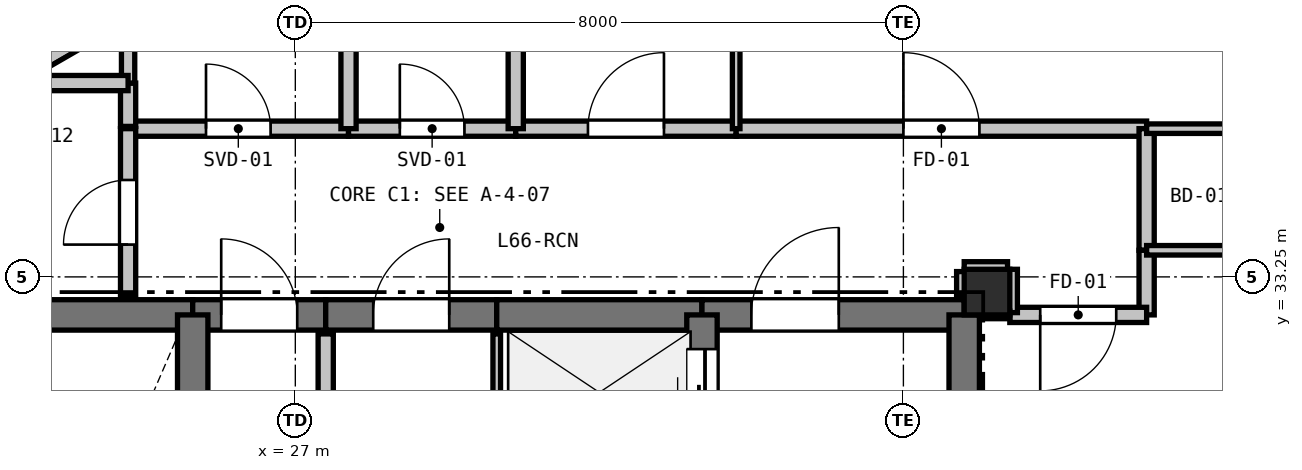
"""IFC4 building model, lengths in metres.
Left out: names, types, materials, properties, quantities, classifications, styles, units other than length and angle.
Written with IfcOpenShell. Run it as: python <this file> out.ifc"""

import sys

from ifc_helpers import new_model, si_unit, direction, frame, frame_2d, origin, origin_2d, place, context, subcontext, project, spatial, rectangle, extrude, element, fill, save


model = new_model("IFC4")
c1 = context("Model", 3, precision=1e-05, world=origin(), true_north=direction((0.0, 1.0)))
c2 = subcontext(c1, "Body", "Model", "MODEL_VIEW")
j1 = project(units=[si_unit("LENGTHUNIT", "METRE"), si_unit("PLANEANGLEUNIT", "RADIAN")], contexts=[c1])
p1 = place(None, origin())
s1 = spatial("IfcSite", under=j1, at=p1, CompositionType="ELEMENT")
p2 = place(p1, origin())
s2 = spatial("IfcBuilding", under=s1, at=p2, CompositionType="ELEMENT")
p3 = place(p2, frame((0.0, 0.0, 236.4)))
s3 = spatial("IfcBuildingStorey", under=s2, at=p3, CompositionType="ELEMENT", Elevation=236.4)
p4 = place(p3, frame((36.1, 33.05, 0.0), z_axis=(0.0, 0.0, 1.0), x_axis=(1.0, 0.0, 0.0)))
e1 = element("IfcColumn", 1, at=p4, inside=s3, PredefinedType="COLUMN", context=c2, shape_type="SweptSolid", body=[
    extrude(rectangle(XDim=0.6, YDim=0.6, at=origin_2d()), origin(), (0.0, 0.0, 1.0), 3.3),
])
p5 = place(p3, frame((20.066, 33.997, 0.0), z_axis=(0.0, 0.0, 1.0), x_axis=(0.866019557082, 0.500010126649, 0.0)))
e2 = element("IfcWall", 2, at=p5, inside=s3, PredefinedType="PARAPET", context=c2, shape_type="SweptSolid", body=[
    extrude(rectangle(XDim=8.228, YDim=0.2, at=frame_2d((4.114, 0.0))), origin(), (0.0, 0.0, 1.0), 0.2),
])
p6 = place(p3, frame((22.2, 32.75, 0.0), z_axis=(0.0, 0.0, 1.0), x_axis=(1.0, 0.0, 0.0)))
e3 = element("IfcWall", 3, at=p6, inside=s3, PredefinedType="SHEAR", context=c2, shape_type="SweptSolid", body=[
    extrude(rectangle(XDim=3.45, YDim=0.4, at=frame_2d((1.725, 0.0))), origin(), (0.0, 0.0, 1.0), 3.08),
])
p7 = place(p3, frame((25.65, 32.75, 0.0), z_axis=(0.0, 0.0, 1.0), x_axis=(1.0, 0.0, 0.0)))
e4 = element("IfcWall", 4, at=p7, inside=s3, PredefinedType="SHEAR", context=c2, shape_type="SweptSolid", body=[
    extrude(rectangle(XDim=1.75, YDim=0.4, at=frame_2d((0.875, 0.0))), origin(), (0.0, 0.0, 1.0), 3.08),
])
p8 = place(p7, frame((0.375, 0.0, 0.0)))
e5 = element("IfcOpeningElement", 5, at=p8, cuts=e4, PredefinedType="OPENING", context=c2, shape_type="SweptSolid", body=[
    extrude(rectangle(XDim=1.0, YDim=2.15, at=frame_2d((0.5, 1.075))), frame((0.0, 0.21, 0.0), z_axis=(0.0, -1.0, 0.0), x_axis=(1.0, 0.0, 0.0)), (0.0, 0.0, 1.0), 0.42),
])
p9 = place(p3, frame((27.4, 32.75, 0.0), z_axis=(0.0, 0.0, 1.0), x_axis=(1.0, 0.0, 0.0)))
e6 = element("IfcWall", 6, at=p9, inside=s3, PredefinedType="SHEAR", context=c2, shape_type="SweptSolid", body=[
    extrude(rectangle(XDim=2.25, YDim=0.4, at=frame_2d((1.125, 0.0))), origin(), (0.0, 0.0, 1.0), 3.08),
])
p10 = place(p9, frame((0.625, 0.0, 0.0)))
e7 = element("IfcOpeningElement", 7, at=p10, cuts=e6, PredefinedType="OPENING", context=c2, shape_type="SweptSolid", body=[
    extrude(rectangle(XDim=1.0, YDim=2.15, at=frame_2d((0.5, 1.075))), frame((0.0, 0.21, 0.0), z_axis=(0.0, -1.0, 0.0), x_axis=(1.0, 0.0, 0.0)), (0.0, 0.0, 1.0), 0.42),
])
p11 = place(p3, frame((29.65, 32.75, 0.0), z_axis=(0.0, 0.0, 1.0), x_axis=(1.0, 0.0, 0.0)))
e8 = element("IfcWall", 8, at=p11, inside=s3, PredefinedType="SHEAR", context=c2, shape_type="SweptSolid", body=[
    extrude(rectangle(XDim=2.7, YDim=0.4, at=frame_2d((1.35, 0.0))), origin(), (0.0, 0.0, 1.0), 3.08),
])
p12 = place(p3, frame((32.35, 32.75, 0.0), z_axis=(0.0, 0.0, 1.0), x_axis=(1.0, 0.0, 0.0)))
e9 = element("IfcWall", 9, at=p12, inside=s3, PredefinedType="SHEAR", context=c2, shape_type="SweptSolid", body=[
    extrude(rectangle(XDim=3.45, YDim=0.4, at=frame_2d((1.725, 0.0))), origin(), (0.0, 0.0, 1.0), 3.08),
])
p13 = place(p12, frame((0.65, 0.0, 0.0)))
e10 = element("IfcOpeningElement", 10, at=p13, cuts=e9, PredefinedType="OPENING", context=c2, shape_type="SweptSolid", body=[
    extrude(rectangle(XDim=1.15, YDim=2.15, at=frame_2d((0.575, 1.075))), frame((0.0, 0.21, 0.0), z_axis=(0.0, -1.0, 0.0), x_axis=(1.0, 0.0, 0.0)), (0.0, 0.0, 1.0), 0.42),
])
p14 = place(p3, frame((35.8, 32.75, 0.0), z_axis=(0.0, 0.0, 1.0), x_axis=(0.0, -1.0, 0.0)))
e11 = element("IfcWall", 11, at=p14, inside=s3, PredefinedType="SHEAR", context=c2, shape_type="SweptSolid", body=[
    extrude(rectangle(XDim=4.65, YDim=0.4, at=frame_2d((2.325, 0.0))), origin(), (0.0, 0.0, 1.0), 3.08),
])
p15 = place(p3, frame((25.65, 27.95, 0.0), z_axis=(0.0, 0.0, 1.0), x_axis=(0.0, 1.0, 0.0)))
e12 = element("IfcWall", 12, at=p15, inside=s3, PredefinedType="SHEAR", context=c2, shape_type="SweptSolid", body=[
    extrude(rectangle(XDim=4.8, YDim=0.4, at=frame_2d((2.4, 0.0))), origin(), (0.0, 0.0, 1.0), 3.08),
])
p16 = place(p3, frame((32.35, 30.75, 0.0), z_axis=(0.0, 0.0, 1.0), x_axis=(0.0, 1.0, 0.0)))
e13 = element("IfcWall", 13, at=p16, inside=s3, PredefinedType="SHEAR", context=c2, shape_type="SweptSolid", body=[
    extrude(rectangle(XDim=2.0, YDim=0.4, at=frame_2d((1.0, 0.0))), origin(), (0.0, 0.0, 1.0), 3.08),
])
p17 = place(p16, frame((0.45, 0.0, 0.0)))
e14 = element("IfcOpeningElement", 14, at=p17, cuts=e13, PredefinedType="OPENING", context=c2, shape_type="SweptSolid", body=[
    extrude(rectangle(XDim=1.1, YDim=2.15, at=frame_2d((0.55, 1.075))), frame((0.0, 0.21, 0.0), z_axis=(0.0, -1.0, 0.0), x_axis=(1.0, 0.0, 0.0)), (0.0, 0.0, 1.0), 0.42),
])
p18 = place(p3, frame((29.65, 30.3, 0.0), z_axis=(0.0, 0.0, 1.0), x_axis=(0.0, 1.0, 0.0)))
e15 = element("IfcWall", 15, at=p18, inside=s3, PredefinedType="PARTITIONING", context=c2, shape_type="SweptSolid", body=[
    extrude(rectangle(XDim=2.2, YDim=0.1, at=frame_2d((1.1, 0.0))), origin(), (0.0, 0.0, 1.0), 3.08),
])
p19 = place(p3, frame((27.4, 32.5, 0.0), z_axis=(0.0, 0.0, 1.0), x_axis=(0.0, -1.0, 0.0)))
e16 = element("IfcWall", 16, at=p19, inside=s3, PredefinedType="PARTITIONING", context=c2, shape_type="SweptSolid", body=[
    extrude(rectangle(XDim=4.55, YDim=0.2, at=frame_2d((2.275, 0.0))), origin(), (0.0, 0.0, 1.0), 3.08),
])
p20 = place(p19, frame((1.775, 0.0, 0.0)))
e17 = element("IfcOpeningElement", 17, at=p20, cuts=e16, PredefinedType="OPENING", context=c2, shape_type="SweptSolid", body=[
    extrude(rectangle(XDim=1.0, YDim=2.15, at=frame_2d((0.5, 1.075))), frame((0.0, 0.11, 0.0), z_axis=(0.0, -1.0, 0.0), x_axis=(1.0, 0.0, 0.0)), (0.0, 0.0, 1.0), 0.22),
])
p21 = place(p3, frame((24.8, 35.2, 0.0), z_axis=(0.0, 0.0, 1.0), x_axis=(1.0, 0.0, 0.0)))
e18 = element("IfcWall", 18, at=p21, inside=s3, PredefinedType="PARTITIONING", context=c2, shape_type="SweptSolid", body=[
    extrude(rectangle(XDim=2.9, YDim=0.2, at=frame_2d((1.45, 0.0))), origin(), (0.0, 0.0, 1.0), 3.08),
])
p22 = place(p21, frame((1.025, 0.0, 0.0)))
e19 = element("IfcOpeningElement", 19, at=p22, cuts=e18, PredefinedType="OPENING", context=c2, shape_type="SweptSolid", body=[
    extrude(rectangle(XDim=0.85, YDim=2.1, at=frame_2d((0.425, 1.05))), frame((0.0, 0.11, 0.0), z_axis=(0.0, -1.0, 0.0), x_axis=(1.0, 0.0, 0.0)), (0.0, 0.0, 1.0), 0.22),
])
p23 = place(p3, frame((27.7, 35.2, 0.0), z_axis=(0.0, 0.0, 1.0), x_axis=(1.0, 0.0, 0.0)))
e20 = element("IfcWall", 20, at=p23, inside=s3, PredefinedType="PARTITIONING", context=c2, shape_type="SweptSolid", body=[
    extrude(rectangle(XDim=2.2, YDim=0.2, at=frame_2d((1.1, 0.0))), origin(), (0.0, 0.0, 1.0), 3.08),
])
p24 = place(p23, frame((0.675, 0.0, 0.0)))
e21 = element("IfcOpeningElement", 21, at=p24, cuts=e20, PredefinedType="OPENING", context=c2, shape_type="SweptSolid", body=[
    extrude(rectangle(XDim=0.85, YDim=2.1, at=frame_2d((0.425, 1.05))), frame((0.0, 0.11, 0.0), z_axis=(0.0, -1.0, 0.0), x_axis=(1.0, 0.0, 0.0)), (0.0, 0.0, 1.0), 0.22),
])
p25 = place(p3, frame((29.9, 35.2, 0.0), z_axis=(0.0, 0.0, 1.0), x_axis=(1.0, 0.0, 0.0)))
e22 = element("IfcWall", 22, at=p25, inside=s3, PredefinedType="PARTITIONING", context=c2, shape_type="SweptSolid", body=[
    extrude(rectangle(XDim=2.9, YDim=0.2, at=frame_2d((1.45, 0.0))), origin(), (0.0, 0.0, 1.0), 3.08),
])
p26 = place(p25, frame((0.95, 0.0, 0.0)))
e23 = element("IfcOpeningElement", 23, at=p26, cuts=e22, PredefinedType="OPENING", context=c2, shape_type="SweptSolid", body=[
    extrude(rectangle(XDim=1.0, YDim=2.15, at=frame_2d((0.5, 1.075))), frame((0.0, 0.11, 0.0), z_axis=(0.0, -1.0, 0.0), x_axis=(1.0, 0.0, 0.0)), (0.0, 0.0, 1.0), 0.22),
])
p27 = place(p3, frame((32.8, 35.2, 0.0), z_axis=(0.0, 0.0, 1.0), x_axis=(1.0, 0.0, 0.0)))
e24 = element("IfcWall", 24, at=p27, inside=s3, PredefinedType="PARTITIONING", context=c2, shape_type="SweptSolid", body=[
    extrude(rectangle(XDim=5.4, YDim=0.2, at=frame_2d((2.7, 0.0))), origin(), (0.0, 0.0, 1.0), 2.528),
])
p28 = place(p27, frame((2.2, 0.0, 0.0)))
e25 = element("IfcOpeningElement", 25, at=p28, cuts=e24, PredefinedType="OPENING", context=c2, shape_type="SweptSolid", body=[
    extrude(rectangle(XDim=1.0, YDim=2.15, at=frame_2d((0.5, 1.075))), frame((0.0, 0.11, 0.0), z_axis=(0.0, -1.0, 0.0), x_axis=(1.0, 0.0, 0.0)), (0.0, 0.0, 1.0), 0.22),
])
p29 = place(p3, frame((38.2, 35.2, 0.0), z_axis=(0.0, 0.0, 1.0), x_axis=(0.0, -1.0, 0.0)))
e26 = element("IfcWall", 26, at=p29, inside=s3, PredefinedType="PARTITIONING", context=c2, shape_type="SweptSolid", body=[
    extrude(rectangle(XDim=1.6, YDim=0.2, at=frame_2d((0.8, 0.0))), origin(), (0.0, 0.0, 1.0), 3.08),
])
p30 = place(p3, frame((38.2, 33.6, 0.0), z_axis=(0.0, 0.0, 1.0), x_axis=(0.0, -1.0, 0.0)))
e27 = element("IfcWall", 27, at=p30, inside=s3, PredefinedType="PARTITIONING", context=c2, shape_type="SweptSolid", body=[
    extrude(rectangle(XDim=0.85, YDim=0.2, at=frame_2d((0.425, 0.0))), origin(), (0.0, 0.0, 1.0), 3.08),
])
p31 = place(p3, frame((38.2, 32.75, 0.0), z_axis=(0.0, 0.0, 1.0), x_axis=(-1.0, 0.0, 0.0)))
e28 = element("IfcWall", 28, at=p31, inside=s3, PredefinedType="PARTITIONING", context=c2, shape_type="SweptSolid", body=[
    extrude(rectangle(XDim=1.8, YDim=0.2, at=frame_2d((0.9, 0.0))), origin(), (0.0, 0.0, 1.0), 3.08),
])
p32 = place(p31, frame((0.4, 0.0, 0.0)))
e29 = element("IfcOpeningElement", 29, at=p32, cuts=e28, PredefinedType="OPENING", context=c2, shape_type="SweptSolid", body=[
    extrude(rectangle(XDim=1.0, YDim=2.15, at=frame_2d((0.5, 1.075))), frame((0.0, 0.11, 0.0), z_axis=(0.0, -1.0, 0.0), x_axis=(1.0, 0.0, 0.0)), (0.0, 0.0, 1.0), 0.22),
])
for number, where, z_axis, x_axis in (
    (30, (36.4, 32.78, 0.0), (0.0, 0.0, 1.0), (0.0, 1.0, 0.0)),
    (31, (36.37, 33.35, 0.0), (0.0, 0.0, 1.0), (-1.0, 0.0, 0.0)),
):
    element("IfcWall", number, at=place(p3, frame(where, z_axis=z_axis, x_axis=x_axis)), inside=s3, PredefinedType="PARTITIONING", context=c2, shape_type="SweptSolid", body=[
        extrude(rectangle(XDim=0.57, YDim=0.2, at=frame_2d((0.285, 0.0))), origin(), (0.0, 0.0, 1.0), 2.528),
    ])
p33 = place(p3, frame((35.8, 33.32, 0.0), z_axis=(0.0, 0.0, 1.0), x_axis=(0.0, -1.0, 0.0)))
e32 = element("IfcWall", 32, at=p33, inside=s3, PredefinedType="PARTITIONING", context=c2, shape_type="SweptSolid", body=[
    extrude(rectangle(XDim=0.32, YDim=0.2, at=frame_2d((0.16, 0.0))), origin(), (0.0, 0.0, 1.0), 2.605),
])
p34 = place(p3, frame((24.8, 33.0, 0.0), z_axis=(0.0, 0.0, 1.0), x_axis=(0.0, 1.0, 0.0)))
e33 = element("IfcWall", 33, at=p34, inside=s3, PredefinedType="PARTITIONING", context=c2, shape_type="SweptSolid", body=[
    extrude(rectangle(XDim=2.2, YDim=0.2, at=frame_2d((1.1, 0.0))), origin(), (0.0, 0.0, 1.0), 2.605),
])
p35 = place(p34, frame((0.675, 0.0, 0.0)))
e34 = element("IfcOpeningElement", 34, at=p35, cuts=e33, PredefinedType="OPENING", context=c2, shape_type="SweptSolid", body=[
    extrude(rectangle(XDim=0.85, YDim=2.1, at=frame_2d((0.425, 1.05))), frame((0.0, 0.11, 0.0), z_axis=(0.0, -1.0, 0.0), x_axis=(1.0, 0.0, 0.0)), (0.0, 0.0, 1.0), 0.22),
])
p36 = place(p3, frame((27.7, 38.053, 0.0), z_axis=(0.0, 0.0, 1.0), x_axis=(0.0, -1.0, 0.0)))
e35 = element("IfcWall", 35, at=p36, inside=s3, PredefinedType="PARTITIONING", context=c2, shape_type="SweptSolid", body=[
    extrude(rectangle(XDim=2.853, YDim=0.2, at=frame_2d((1.427, 0.0))), origin(), (0.0, 0.0, 1.0), 2.365),
])
p37 = place(p3, frame((24.8, 35.23, 0.0), z_axis=(0.0, 0.0, 1.0), x_axis=(0.0, 1.0, 0.0)))
e36 = element("IfcWall", 36, at=p37, inside=s3, PredefinedType="PARTITIONING", context=c2, shape_type="SweptSolid", body=[
    extrude(rectangle(XDim=0.57, YDim=0.2, at=frame_2d((0.285, 0.0))), origin(), (0.0, 0.0, 1.0), 3.08),
])
p38 = place(p3, frame((24.8, 35.8, 0.0), z_axis=(0.0, 0.0, 1.0), x_axis=(0.0, 1.0, 0.0)))
e37 = element("IfcWall", 37, at=p38, inside=s3, PredefinedType="PLUMBINGWALL", context=c2, shape_type="SweptSolid", body=[
    extrude(rectangle(XDim=0.884, YDim=0.175, at=frame_2d((0.442, 0.0))), origin(), (0.0, 0.0, 1.0), 2.365),
])
p39 = place(p3, frame((39.606, 35.2, 0.0), z_axis=(0.0, 0.0, 1.0), x_axis=(-1.0, 0.0, 0.0)))
e38 = element("IfcWall", 38, at=p39, inside=s3, PredefinedType="PARTITIONING", context=c2, shape_type="SweptSolid", body=[
    extrude(rectangle(XDim=1.406, YDim=0.125, at=frame_2d((0.703, 0.0))), origin(), (0.0, 0.0, 1.0), 2.365),
])
p40 = place(p3, frame((32.8, 35.2, 0.0), z_axis=(0.0, 0.0, 1.0), x_axis=(0.0, 1.0, 0.0)))
e39 = element("IfcWall", 39, at=p40, inside=s3, PredefinedType="PARTITIONING", context=c2, shape_type="SweptSolid", body=[
    extrude(rectangle(XDim=5.991, YDim=0.1, at=frame_2d((2.996, 0.0))), origin(), (0.0, 0.0, 1.0), 3.08),
])
p41 = place(p3, frame((36.05, 32.75, 0.0), z_axis=(0.0, 0.0, 1.0), x_axis=(1.0, 0.0, 0.0)))
e40 = element("IfcWall", 40, at=p41, inside=s3, PredefinedType="PARTITIONING", context=c2, shape_type="SweptSolid", body=[
    extrude(rectangle(XDim=0.35, YDim=0.1, at=frame_2d((0.175, 0.0))), origin(), (0.0, 0.0, 1.0), 2.605),
])
p42 = place(p3, frame((38.2, 33.6, 0.0), z_axis=(0.0, 0.0, 1.0), x_axis=(1.0, 0.0, 0.0)))
e41 = element("IfcWall", 41, at=p42, inside=s3, PredefinedType="PARTITIONING", context=c2, shape_type="SweptSolid", body=[
    extrude(rectangle(XDim=1.406, YDim=0.125, at=frame_2d((0.703, 0.0))), origin(), (0.0, 0.0, 1.0), 2.365),
])
p43 = place(p3, frame((29.9, 37.5, 0.0), z_axis=(0.0, 0.0, 1.0), x_axis=(0.0, -1.0, 0.0)))
e42 = element("IfcWall", 42, at=p43, inside=s3, PredefinedType="PARTITIONING", context=c2, shape_type="SweptSolid", body=[
    extrude(rectangle(XDim=2.3, YDim=0.2, at=frame_2d((1.15, 0.0))), origin(), (0.0, 0.0, 1.0), 3.08),
])
p44 = place(p3, frame((23.262, 35.8, 0.0), z_axis=(0.0, 0.0, 1.0), x_axis=(1.0, 0.0, 0.0)))
e43 = element("IfcWall", 43, at=p44, inside=s3, PredefinedType="PARTITIONING", context=c2, shape_type="SweptSolid", body=[
    extrude(rectangle(XDim=1.538, YDim=0.2, at=frame_2d((0.769, 0.0))), origin(), (0.0, 0.0, 1.0), 2.365),
])
p45 = place(p8, origin())
e44 = element("IfcDoor", 44, at=p45, inside=s3, OperationType="SINGLE_SWING_LEFT", PredefinedType="DOOR", context=c2, shape_type="SweptSolid", body=[
    extrude(rectangle(XDim=1.0, YDim=2.15, at=frame_2d((0.5, 1.075))), frame((0.0, 0.025, 0.0), z_axis=(0.0, -1.0, 0.0), x_axis=(1.0, 0.0, 0.0)), (0.0, 0.0, 1.0), 0.05),
])
fill(e5, e44)
p46 = place(p17, origin())
e45 = element("IfcDoor", 45, at=p46, inside=s3, OperationType="SLIDING_TO_LEFT", PredefinedType="DOOR", context=c2, shape_type="SweptSolid", body=[
    extrude(rectangle(XDim=1.1, YDim=2.15, at=frame_2d((0.55, 1.075))), frame((0.0, 0.025, 0.0), z_axis=(0.0, -1.0, 0.0), x_axis=(1.0, 0.0, 0.0)), (0.0, 0.0, 1.0), 0.05),
])
fill(e14, e45)
p47 = place(p13, origin())
e46 = element("IfcDoor", 46, at=p47, inside=s3, OperationType="SINGLE_SWING_RIGHT", PredefinedType="DOOR", context=c2, shape_type="SweptSolid", body=[
    extrude(rectangle(XDim=1.15, YDim=2.15, at=frame_2d((0.575, 1.075))), frame((0.0, 0.025, 0.0), z_axis=(0.0, -1.0, 0.0), x_axis=(1.0, 0.0, 0.0)), (0.0, 0.0, 1.0), 0.05),
])
fill(e10, e46)
p48 = place(p22, origin())
e47 = element("IfcDoor", 47, at=p48, inside=s3, OperationType="SINGLE_SWING_LEFT", PredefinedType="DOOR", context=c2, shape_type="SweptSolid", body=[
    extrude(rectangle(XDim=0.85, YDim=2.1, at=frame_2d((0.425, 1.05))), frame((0.0, 0.025, 0.0), z_axis=(0.0, -1.0, 0.0), x_axis=(1.0, 0.0, 0.0)), (0.0, 0.0, 1.0), 0.05),
])
fill(e19, e47)
p49 = place(p10, origin())
e48 = element("IfcDoor", 48, at=p49, inside=s3, OperationType="SINGLE_SWING_RIGHT", PredefinedType="DOOR", context=c2, shape_type="SweptSolid", body=[
    extrude(rectangle(XDim=1.0, YDim=2.15, at=frame_2d((0.5, 1.075))), frame((0.0, 0.025, 0.0), z_axis=(0.0, -1.0, 0.0), x_axis=(1.0, 0.0, 0.0)), (0.0, 0.0, 1.0), 0.05),
])
fill(e7, e48)
p50 = place(p28, origin())
e49 = element("IfcDoor", 49, at=p50, inside=s3, OperationType="SINGLE_SWING_LEFT", PredefinedType="DOOR", context=c2, shape_type="SweptSolid", body=[
    extrude(rectangle(XDim=1.0, YDim=2.15, at=frame_2d((0.5, 1.075))), frame((0.0, 0.025, 0.0), z_axis=(0.0, -1.0, 0.0), x_axis=(1.0, 0.0, 0.0)), (0.0, 0.0, 1.0), 0.05),
])
fill(e25, e49)
p51 = place(p32, origin())
e50 = element("IfcDoor", 50, at=p51, inside=s3, OperationType="SINGLE_SWING_RIGHT", PredefinedType="DOOR", context=c2, shape_type="SweptSolid", body=[
    extrude(rectangle(XDim=1.0, YDim=2.15, at=frame_2d((0.5, 1.075))), frame((0.0, 0.025, 0.0), z_axis=(0.0, -1.0, 0.0), x_axis=(1.0, 0.0, 0.0)), (0.0, 0.0, 1.0), 0.05),
])
fill(e29, e50)
p52 = place(p24, origin())
e51 = element("IfcDoor", 51, at=p52, inside=s3, OperationType="SINGLE_SWING_LEFT", PredefinedType="DOOR", context=c2, shape_type="SweptSolid", body=[
    extrude(rectangle(XDim=0.85, YDim=2.1, at=frame_2d((0.425, 1.05))), frame((0.0, 0.025, 0.0), z_axis=(0.0, -1.0, 0.0), x_axis=(1.0, 0.0, 0.0)), (0.0, 0.0, 1.0), 0.05),
])
fill(e21, e51)
p53 = place(p26, origin())
e52 = element("IfcDoor", 52, at=p53, inside=s3, OperationType="SINGLE_SWING_RIGHT", PredefinedType="DOOR", context=c2, shape_type="SweptSolid", body=[
    extrude(rectangle(XDim=1.0, YDim=2.15, at=frame_2d((0.5, 1.075))), frame((0.0, 0.025, 0.0), z_axis=(0.0, -1.0, 0.0), x_axis=(1.0, 0.0, 0.0)), (0.0, 0.0, 1.0), 0.05),
])
fill(e23, e52)
p54 = place(p35, origin())
e53 = element("IfcDoor", 53, at=p54, inside=s3, OperationType="SINGLE_SWING_LEFT", PredefinedType="DOOR", context=c2, shape_type="SweptSolid", body=[
    extrude(rectangle(XDim=0.85, YDim=2.1, at=frame_2d((0.425, 1.05))), frame((0.0, 0.025, 0.0), z_axis=(0.0, -1.0, 0.0), x_axis=(1.0, 0.0, 0.0)), (0.0, 0.0, 1.0), 0.05),
])
fill(e34, e53)
save(model, sys.argv[1])
